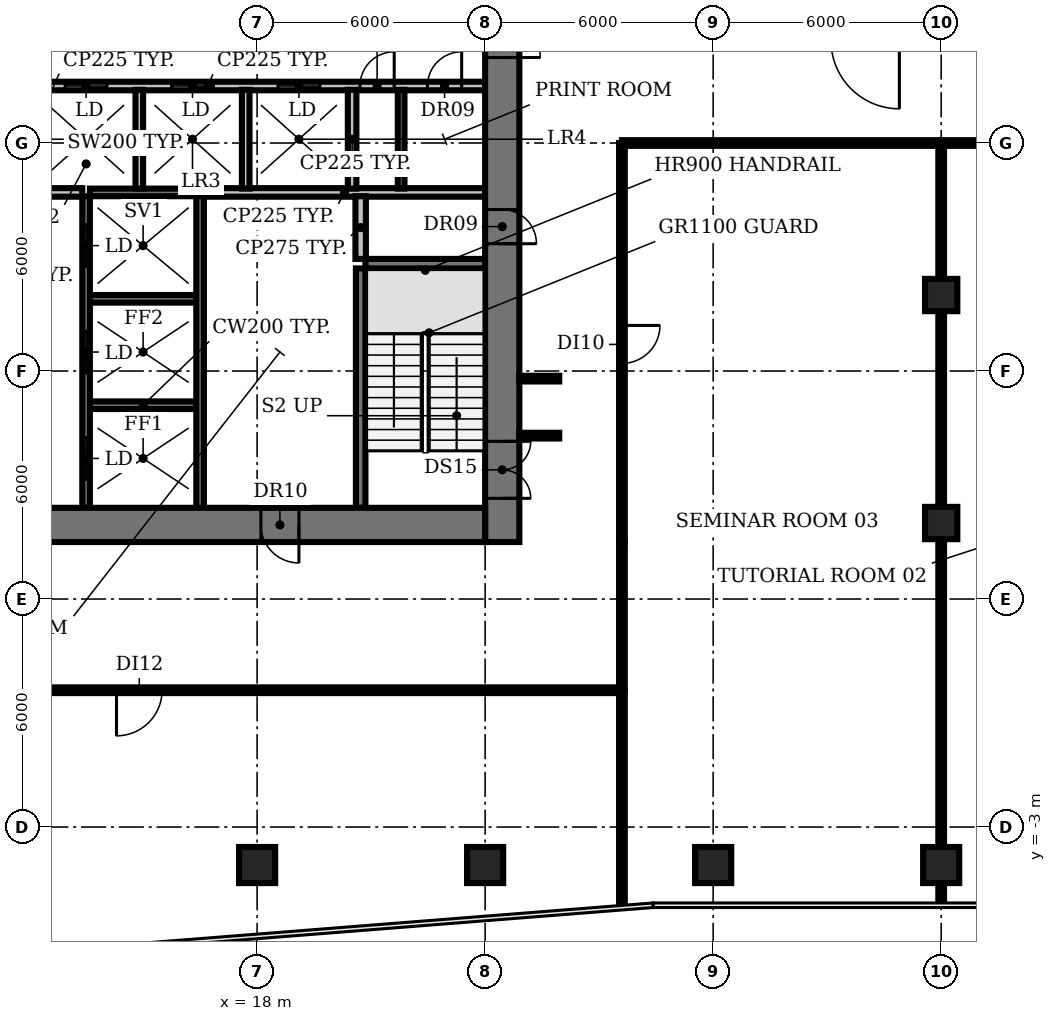
"""IFC4 building model, lengths in metres.
Left out: names, types, materials, properties, quantities, classifications, styles, units other than length and angle.
Written with IfcOpenShell. Run it as: python <this file> out.ifc"""

import sys

from ifc_helpers import new_model, si_unit, direction, frame, frame_2d, origin, origin_2d, place, context, subcontext, project, spatial, rectangle, extrude, element, fill, save


model = new_model("IFC4")
c1 = context("Model", 3, precision=1e-05, world=origin(), true_north=direction((0.0, 1.0)))
c2 = subcontext(c1, "Body", "Model", "MODEL_VIEW")
j1 = project(units=[si_unit("LENGTHUNIT", "METRE"), si_unit("PLANEANGLEUNIT", "RADIAN")], contexts=[c1])
p1 = place(None, origin())
s1 = spatial("IfcSite", under=j1, at=p1, CompositionType="ELEMENT")
p2 = place(p1, origin())
s2 = spatial("IfcBuilding", under=s1, at=p2, CompositionType="ELEMENT")
p3 = place(p2, frame((0.0, 0.0, 71.0)))
s3 = spatial("IfcBuildingStorey", under=s2, at=p3, CompositionType="ELEMENT", Elevation=71.0)
for number, where, z_axis, x_axis in (
    (1, (18.0, -4.0, 0.0), (0.0, 0.0, 1.0), (1.0, 0.0, 0.0)),
    (2, (24.0, -4.0, 0.0), (0.0, 0.0, 1.0), (1.0, 0.0, 0.0)),
    (3, (30.0, -4.0, 0.0), (0.0, 0.0, 1.0), (1.0, 0.0, 0.0)),
    (4, (36.0, -4.0, 0.0), (0.0, 0.0, 1.0), (1.0, 0.0, 0.0)),
):
    element("IfcColumn", number, at=place(p3, frame(where, z_axis=z_axis, x_axis=x_axis)), inside=s3, PredefinedType="COLUMN", context=c2, shape_type="SweptSolid", body=[
        extrude(rectangle(XDim=0.95, YDim=0.95, at=origin_2d()), origin(), (0.0, 0.0, 1.0), 3.85),
    ])
for number, where, z_axis, x_axis in (
    (5, (36.0, 5.0, 0.0), (0.0, 0.0, 1.0), (1.0, 0.0, 0.0)),
    (6, (36.0, 11.0, 0.0), (0.0, 0.0, 1.0), (1.0, 0.0, 0.0)),
):
    element("IfcColumn", number, at=place(p3, frame(where, z_axis=z_axis, x_axis=x_axis)), inside=s3, PredefinedType="COLUMN", context=c2, shape_type="SweptSolid", body=[
        extrude(rectangle(XDim=0.85, YDim=0.85, at=origin_2d()), origin(), (0.0, 0.0, 1.0), 3.85),
    ])
for number, where, z_axis, x_axis in (
    (7, (13.6, 8.1, 0.0), (0.0, 0.0, 1.0), (1.0, 0.0, 0.0)),
    (8, (13.6, 10.9, 0.0), (0.0, 0.0, 1.0), (1.0, 0.0, 0.0)),
):
    element("IfcWall", number, at=place(p3, frame(where, z_axis=z_axis, x_axis=x_axis)), inside=s3, PredefinedType="SHEAR", context=c2, shape_type="SweptSolid", body=[
        extrude(rectangle(XDim=2.8, YDim=0.2, at=frame_2d((1.4, 0.0))), origin(), (0.0, 0.0, 1.0), 3.85),
    ])
p4 = place(p3, frame((20.85, 11.825, 0.0), z_axis=(0.0, 0.0, 1.0), x_axis=(1.0, 0.0, 0.0)))
e9 = element("IfcWall", 9, at=p4, inside=s3, PredefinedType="SHEAR", context=c2, shape_type="SweptSolid", body=[
    extrude(rectangle(XDim=3.15, YDim=0.25, at=frame_2d((1.575, 0.0))), origin(), (0.0, 0.0, 1.0), 3.85),
])
p5 = place(p3, frame((9.4, 13.7, 0.0), z_axis=(0.0, 0.0, 1.0), x_axis=(1.0, 0.0, 0.0)))
e10 = element("IfcWall", 10, at=p5, inside=s3, PredefinedType="PARTITIONING", context=c2, shape_type="SweptSolid", body=[
    extrude(rectangle(XDim=4.0, YDim=0.225, at=frame_2d((2.0, 0.0))), origin(), (0.0, 0.0, 1.0), 3.85),
])
p6 = place(p3, frame((13.6, 13.7, 0.0), z_axis=(0.0, 0.0, 1.0), x_axis=(1.0, 0.0, 0.0)))
e11 = element("IfcWall", 11, at=p6, inside=s3, PredefinedType="SHEAR", context=c2, shape_type="SweptSolid", body=[
    extrude(rectangle(XDim=2.8, YDim=0.2, at=frame_2d((1.4, 0.0))), origin(), (0.0, 0.0, 1.0), 3.85),
])
p7 = place(p3, frame((16.6, 13.7, 0.0), z_axis=(0.0, 0.0, 1.0), x_axis=(1.0, 0.0, 0.0)))
e12 = element("IfcWall", 12, at=p7, inside=s3, PredefinedType="PARTITIONING", context=c2, shape_type="SweptSolid", body=[
    extrude(rectangle(XDim=7.4, YDim=0.225, at=frame_2d((3.7, 0.0))), origin(), (0.0, 0.0, 1.0), 3.85),
])
p8 = place(p3, frame((9.4, 16.5, 0.0), z_axis=(0.0, 0.0, 1.0), x_axis=(1.0, 0.0, 0.0)))
e13 = element("IfcWall", 13, at=p8, inside=s3, PredefinedType="PARTITIONING", context=c2, shape_type="SweptSolid", body=[
    extrude(rectangle(XDim=14.6, YDim=0.225, at=frame_2d((7.3, 0.0))), origin(), (0.0, 0.0, 1.0), 3.85),
])
p9 = place(p8, frame((0.75, 0.0, 0.0)))
e14 = element("IfcOpeningElement", 14, at=p9, cuts=e13, PredefinedType="OPENING", context=c2, shape_type="SweptSolid", body=[
    extrude(rectangle(XDim=1.1, YDim=2.1, at=frame_2d((0.55, 1.05))), frame((0.0, 0.123, 0.0), z_axis=(0.0, -1.0, 0.0), x_axis=(1.0, 0.0, 0.0)), (0.0, 0.0, 1.0), 0.245),
])
p10 = place(p8, frame((3.55, 0.0, 0.0)))
e15 = element("IfcOpeningElement", 15, at=p10, cuts=e13, PredefinedType="OPENING", context=c2, shape_type="SweptSolid", body=[
    extrude(rectangle(XDim=1.1, YDim=2.1, at=frame_2d((0.55, 1.05))), frame((0.0, 0.123, 0.0), z_axis=(0.0, -1.0, 0.0), x_axis=(1.0, 0.0, 0.0)), (0.0, 0.0, 1.0), 0.245),
])
p11 = place(p8, frame((6.35, 0.0, 0.0)))
e16 = element("IfcOpeningElement", 16, at=p11, cuts=e13, PredefinedType="OPENING", context=c2, shape_type="SweptSolid", body=[
    extrude(rectangle(XDim=1.1, YDim=2.1, at=frame_2d((0.55, 1.05))), frame((0.0, 0.123, 0.0), z_axis=(0.0, -1.0, 0.0), x_axis=(1.0, 0.0, 0.0)), (0.0, 0.0, 1.0), 0.245),
])
p12 = place(p8, frame((9.15, 0.0, 0.0)))
e17 = element("IfcOpeningElement", 17, at=p12, cuts=e13, PredefinedType="OPENING", context=c2, shape_type="SweptSolid", body=[
    extrude(rectangle(XDim=1.1, YDim=2.1, at=frame_2d((0.55, 1.05))), frame((0.0, 0.123, 0.0), z_axis=(0.0, -1.0, 0.0), x_axis=(1.0, 0.0, 0.0)), (0.0, 0.0, 1.0), 0.245),
])
p13 = place(p8, frame((11.308, 0.0, 0.0)))
e18 = element("IfcOpeningElement", 18, at=p13, cuts=e13, PredefinedType="OPENING", context=c2, shape_type="SweptSolid", body=[
    extrude(rectangle(XDim=0.9, YDim=2.1, at=frame_2d((0.45, 1.05))), frame((0.0, 0.123, 0.0), z_axis=(0.0, -1.0, 0.0), x_axis=(1.0, 0.0, 0.0)), (0.0, 0.0, 1.0), 0.245),
])
p14 = place(p8, frame((13.083, 0.0, 0.0)))
e19 = element("IfcOpeningElement", 19, at=p14, cuts=e13, PredefinedType="OPENING", context=c2, shape_type="SweptSolid", body=[
    extrude(rectangle(XDim=0.9, YDim=2.1, at=frame_2d((0.45, 1.05))), frame((0.0, 0.123, 0.0), z_axis=(0.0, -1.0, 0.0), x_axis=(1.0, 0.0, 0.0)), (0.0, 0.0, 1.0), 0.245),
])
p15 = place(p3, frame((13.5, 5.4, 0.0), z_axis=(0.0, 0.0, 1.0), x_axis=(0.0, 1.0, 0.0)))
e20 = element("IfcWall", 20, at=p15, inside=s3, PredefinedType="SHEAR", context=c2, shape_type="SweptSolid", body=[
    extrude(rectangle(XDim=8.2, YDim=0.2, at=frame_2d((4.1, 0.0))), origin(), (0.0, 0.0, 1.0), 3.85),
])
p16 = place(p15, frame((0.75, 0.0, 0.0)))
e21 = element("IfcOpeningElement", 21, at=p16, cuts=e20, PredefinedType="OPENING", context=c2, shape_type="SweptSolid", body=[
    extrude(rectangle(XDim=1.1, YDim=2.1, at=frame_2d((0.55, 1.05))), frame((0.0, 0.11, 0.0), z_axis=(0.0, -1.0, 0.0), x_axis=(1.0, 0.0, 0.0)), (0.0, 0.0, 1.0), 0.22),
])
p17 = place(p15, frame((3.55, 0.0, 0.0)))
e22 = element("IfcOpeningElement", 22, at=p17, cuts=e20, PredefinedType="OPENING", context=c2, shape_type="SweptSolid", body=[
    extrude(rectangle(XDim=1.1, YDim=2.1, at=frame_2d((0.55, 1.05))), frame((0.0, 0.11, 0.0), z_axis=(0.0, -1.0, 0.0), x_axis=(1.0, 0.0, 0.0)), (0.0, 0.0, 1.0), 0.22),
])
p18 = place(p15, frame((6.35, 0.0, 0.0)))
e23 = element("IfcOpeningElement", 23, at=p18, cuts=e20, PredefinedType="OPENING", context=c2, shape_type="SweptSolid", body=[
    extrude(rectangle(XDim=1.1, YDim=2.1, at=frame_2d((0.55, 1.05))), frame((0.0, 0.11, 0.0), z_axis=(0.0, -1.0, 0.0), x_axis=(1.0, 0.0, 0.0)), (0.0, 0.0, 1.0), 0.22),
])
p19 = place(p3, frame((14.9, 13.8, 0.0), z_axis=(0.0, 0.0, 1.0), x_axis=(0.0, 1.0, 0.0)))
e24 = element("IfcWall", 24, at=p19, inside=s3, PredefinedType="SOLIDWALL", context=c2, shape_type="SweptSolid", body=[
    extrude(rectangle(XDim=2.6, YDim=0.2, at=frame_2d((1.3, 0.0))), origin(), (0.0, 0.0, 1.0), 3.85),
])
p20 = place(p3, frame((16.5, 5.4, 0.0), z_axis=(0.0, 0.0, 1.0), x_axis=(0.0, 1.0, 0.0)))
e25 = element("IfcWall", 25, at=p20, inside=s3, PredefinedType="SHEAR", context=c2, shape_type="SweptSolid", body=[
    extrude(rectangle(XDim=8.2, YDim=0.2, at=frame_2d((4.1, 0.0))), origin(), (0.0, 0.0, 1.0), 3.85),
])
p21 = place(p3, frame((17.7, 13.8, 0.0), z_axis=(0.0, 0.0, 1.0), x_axis=(0.0, 1.0, 0.0)))
e26 = element("IfcWall", 26, at=p21, inside=s3, PredefinedType="SOLIDWALL", context=c2, shape_type="SweptSolid", body=[
    extrude(rectangle(XDim=2.6, YDim=0.2, at=frame_2d((1.3, 0.0))), origin(), (0.0, 0.0, 1.0), 3.85),
])
p22 = place(p3, frame((20.5, 13.8, 0.0), z_axis=(0.0, 0.0, 1.0), x_axis=(0.0, 1.0, 0.0)))
e27 = element("IfcWall", 27, at=p22, inside=s3, PredefinedType="PARTITIONING", context=c2, shape_type="SweptSolid", body=[
    extrude(rectangle(XDim=2.6, YDim=0.225, at=frame_2d((1.3, 0.0))), origin(), (0.0, 0.0, 1.0), 3.85),
])
p23 = place(p3, frame((20.725, 5.4, 0.0), z_axis=(0.0, 0.0, 1.0), x_axis=(0.0, 1.0, 0.0)))
e28 = element("IfcWall", 28, at=p23, inside=s3, PredefinedType="SHEAR", context=c2, shape_type="SweptSolid", body=[
    extrude(rectangle(XDim=6.3, YDim=0.25, at=frame_2d((3.15, 0.0))), origin(), (0.0, 0.0, 1.0), 3.85),
])
p24 = place(p3, frame((20.725, 11.95, 0.0), z_axis=(0.0, 0.0, 1.0), x_axis=(0.0, 1.0, 0.0)))
e29 = element("IfcWall", 29, at=p24, inside=s3, PredefinedType="PARTITIONING", context=c2, shape_type="SweptSolid", body=[
    extrude(rectangle(XDim=1.65, YDim=0.275, at=frame_2d((0.825, 0.0))), origin(), (0.0, 0.0, 1.0), 3.85),
])
p25 = place(p3, frame((21.79, 13.8, 0.0), z_axis=(0.0, 0.0, 1.0), x_axis=(0.0, 1.0, 0.0)))
e30 = element("IfcWall", 30, at=p25, inside=s3, PredefinedType="PARTITIONING", context=c2, shape_type="SweptSolid", body=[
    extrude(rectangle(XDim=2.6, YDim=0.175, at=frame_2d((1.3, 0.0))), origin(), (0.0, 0.0, 1.0), 3.85),
])
p26 = place(p3, frame((24.45, 25.7, 0.0), z_axis=(0.0, 0.0, 1.0), x_axis=(0.0, -1.0, 0.0)))
e31 = element("IfcWall", 31, at=p26, inside=s3, PredefinedType="SHEAR", context=c2, shape_type="SweptSolid", body=[
    extrude(rectangle(XDim=21.2, YDim=0.9, at=frame_2d((10.6, 0.0))), origin(), (0.0, 0.0, 1.0), 3.85),
])
p27 = place(p26, frame((18.55, 0.0, 0.0)))
e32 = element("IfcOpeningElement", 32, at=p27, cuts=e31, PredefinedType="OPENING", context=c2, shape_type="SweptSolid", body=[
    extrude(rectangle(XDim=1.5, YDim=2.1, at=frame_2d((0.75, 1.05))), frame((0.0, 0.46, 0.0), z_axis=(0.0, -1.0, 0.0), x_axis=(1.0, 0.0, 0.0)), (0.0, 0.0, 1.0), 0.92),
])
p28 = place(p26, frame((12.45, 0.0, 0.0)))
e33 = element("IfcOpeningElement", 33, at=p28, cuts=e31, PredefinedType="OPENING", context=c2, shape_type="SweptSolid", body=[
    extrude(rectangle(XDim=0.9, YDim=2.1, at=frame_2d((0.45, 1.05))), frame((0.0, 0.46, 0.0), z_axis=(0.0, -1.0, 0.0), x_axis=(1.0, 0.0, 0.0)), (0.0, 0.0, 1.0), 0.92),
])
p29 = place(p26, frame((6.45, 0.0, 0.0)))
e34 = element("IfcOpeningElement", 34, at=p29, cuts=e31, PredefinedType="OPENING", context=c2, shape_type="SweptSolid", body=[
    extrude(rectangle(XDim=2.0, YDim=2.1, at=frame_2d((1.0, 1.05))), frame((0.0, 0.46, 0.0), z_axis=(0.0, -1.0, 0.0), x_axis=(1.0, 0.0, 0.0)), (0.0, 0.0, 1.0), 0.92),
])
p30 = place(p3, frame((24.0, 4.95, 0.0), z_axis=(0.0, 0.0, 1.0), x_axis=(-1.0, 0.0, 0.0)))
e35 = element("IfcWall", 35, at=p30, inside=s3, PredefinedType="SHEAR", context=c2, shape_type="SweptSolid", body=[
    extrude(rectangle(XDim=18.0, YDim=0.9, at=frame_2d((9.0, 0.0))), origin(), (0.0, 0.0, 1.0), 3.85),
])
p31 = place(p30, frame((13.0, 0.0, 0.0)))
e36 = element("IfcOpeningElement", 36, at=p31, cuts=e35, PredefinedType="OPENING", context=c2, shape_type="SweptSolid", body=[
    extrude(rectangle(XDim=1.2, YDim=2.1, at=frame_2d((0.6, 1.05))), frame((0.0, 0.46, 0.0), z_axis=(0.0, -1.0, 0.0), x_axis=(1.0, 0.0, 0.0)), (0.0, 0.0, 1.0), 0.92),
])
p32 = place(p30, frame((4.9, 0.0, 0.0)))
e37 = element("IfcOpeningElement", 37, at=p32, cuts=e35, PredefinedType="OPENING", context=c2, shape_type="SweptSolid", body=[
    extrude(rectangle(XDim=1.0, YDim=2.1, at=frame_2d((0.5, 1.05))), frame((0.0, 0.46, 0.0), z_axis=(0.0, -1.0, 0.0), x_axis=(1.0, 0.0, 0.0)), (0.0, 0.0, 1.0), 0.92),
])
for number, where, z_axis, x_axis in (
    (38, (24.9, 7.3, 0.0), (0.0, 0.0, 1.0), (1.0, 0.0, 0.0)),
    (39, (24.9, 8.8, 0.0), (0.0, 0.0, 1.0), (1.0, 0.0, 0.0)),
):
    element("IfcWall", number, at=place(p3, frame(where, z_axis=z_axis, x_axis=x_axis)), inside=s3, PredefinedType="PARTITIONING", context=c2, shape_type="SweptSolid", body=[
        extrude(rectangle(XDim=1.05, YDim=0.15, at=frame_2d((0.525, 0.0))), origin(), (0.0, 0.0, 1.0), 2.83),
    ])
p33 = place(p3, frame((27.6, -5.07, 0.0), z_axis=(0.0, 0.0, 1.0), x_axis=(0.0, 1.0, 0.0)))
e40 = element("IfcWall", 40, at=p33, inside=s3, PredefinedType="PARTITIONING", context=c2, shape_type="SweptSolid", body=[
    extrude(rectangle(XDim=5.67, YDim=0.15, at=frame_2d((2.835, 0.0))), origin(), (0.0, 0.0, 1.0), 2.83),
])
p34 = place(p3, frame((27.6, 0.6, 0.0), z_axis=(0.0, 0.0, 1.0), x_axis=(-1.0, 0.0, 0.0)))
e41 = element("IfcWall", 41, at=p34, inside=s3, PredefinedType="PARTITIONING", context=c2, shape_type="SweptSolid", body=[
    extrude(rectangle(XDim=25.2, YDim=0.15, at=frame_2d((12.6, 0.0))), origin(), (0.0, 0.0, 1.0), 2.83),
])
p35 = place(p34, frame((12.1, 0.0, 0.0)))
e42 = element("IfcOpeningElement", 42, at=p35, cuts=e41, PredefinedType="OPENING", context=c2, shape_type="SweptSolid", body=[
    extrude(rectangle(XDim=1.2, YDim=2.1, at=frame_2d((0.6, 1.05))), frame((0.0, 0.085, 0.0), z_axis=(0.0, -1.0, 0.0), x_axis=(1.0, 0.0, 0.0)), (0.0, 0.0, 1.0), 0.17),
])
p36 = place(p3, frame((27.6, 0.6, 0.0), z_axis=(0.0, 0.0, 1.0), x_axis=(0.0, 1.0, 0.0)))
e43 = element("IfcWall", 43, at=p36, inside=s3, PredefinedType="PARTITIONING", context=c2, shape_type="SweptSolid", body=[
    extrude(rectangle(XDim=3.9, YDim=0.15, at=frame_2d((1.95, 0.0))), origin(), (0.0, 0.0, 1.0), 2.83),
])
p37 = place(p3, frame((27.6, 15.0, 0.0), z_axis=(0.0, 0.0, 1.0), x_axis=(0.0, -1.0, 0.0)))
e44 = element("IfcWall", 44, at=p37, inside=s3, PredefinedType="PARTITIONING", context=c2, shape_type="SweptSolid", body=[
    extrude(rectangle(XDim=10.5, YDim=0.15, at=frame_2d((5.25, 0.0))), origin(), (0.0, 0.0, 1.0), 2.83),
])
p38 = place(p37, frame((4.8, 0.0, 0.0)))
e45 = element("IfcOpeningElement", 45, at=p38, cuts=e44, PredefinedType="OPENING", context=c2, shape_type="SweptSolid", body=[
    extrude(rectangle(XDim=1.0, YDim=2.1, at=frame_2d((0.5, 1.05))), frame((0.0, 0.085, 0.0), z_axis=(0.0, -1.0, 0.0), x_axis=(1.0, 0.0, 0.0)), (0.0, 0.0, 1.0), 0.17),
])
p39 = place(p3, frame((27.6, 15.0, 0.0), z_axis=(0.0, 0.0, 1.0), x_axis=(1.0, 0.0, 0.0)))
e46 = element("IfcWall", 46, at=p39, inside=s3, PredefinedType="PARTITIONING", context=c2, shape_type="SweptSolid", body=[
    extrude(rectangle(XDim=8.4, YDim=0.15, at=frame_2d((4.2, 0.0))), origin(), (0.0, 0.0, 1.0), 2.83),
])
p40 = place(p3, frame((36.0, -5.01, 0.0), z_axis=(0.0, 0.0, 1.0), x_axis=(0.0, 1.0, 0.0)))
e47 = element("IfcWall", 47, at=p40, inside=s3, PredefinedType="PARTITIONING", context=c2, shape_type="SweptSolid", body=[
    extrude(rectangle(XDim=20.01, YDim=0.15, at=frame_2d((10.005, 0.0))), origin(), (0.0, 0.0, 1.0), 2.83),
])
p41 = place(p3, frame((42.0, 15.0, 0.0), z_axis=(0.0, 0.0, 1.0), x_axis=(-1.0, 0.0, 0.0)))
e48 = element("IfcWall", 48, at=p41, inside=s3, PredefinedType="PARTITIONING", context=c2, shape_type="SweptSolid", body=[
    extrude(rectangle(XDim=6.0, YDim=0.15, at=frame_2d((3.0, 0.0))), origin(), (0.0, 0.0, 1.0), 2.83),
])
p42 = place(p41, frame((2.4, 0.0, 0.0)))
e49 = element("IfcOpeningElement", 49, at=p42, cuts=e48, PredefinedType="OPENING", context=c2, shape_type="SweptSolid", body=[
    extrude(rectangle(XDim=1.0, YDim=2.1, at=frame_2d((0.5, 1.05))), frame((0.0, 0.085, 0.0), z_axis=(0.0, -1.0, 0.0), x_axis=(1.0, 0.0, 0.0)), (0.0, 0.0, 1.0), 0.17),
])
p43 = place(p10, origin())
e50 = element("IfcDoor", 50, at=p43, inside=s3, OperationType="DOUBLE_DOOR_SLIDING", PredefinedType="DOOR", context=c2, shape_type="SweptSolid", body=[
    extrude(rectangle(XDim=1.1, YDim=2.1, at=frame_2d((0.55, 1.05))), frame((0.0, 0.025, 0.0), z_axis=(0.0, -1.0, 0.0), x_axis=(1.0, 0.0, 0.0)), (0.0, 0.0, 1.0), 0.05),
])
fill(e15, e50)
p44 = place(p11, origin())
e51 = element("IfcDoor", 51, at=p44, inside=s3, OperationType="DOUBLE_DOOR_SLIDING", PredefinedType="DOOR", context=c2, shape_type="SweptSolid", body=[
    extrude(rectangle(XDim=1.1, YDim=2.1, at=frame_2d((0.55, 1.05))), frame((0.0, 0.025, 0.0), z_axis=(0.0, -1.0, 0.0), x_axis=(1.0, 0.0, 0.0)), (0.0, 0.0, 1.0), 0.05),
])
fill(e16, e51)
p45 = place(p12, origin())
e52 = element("IfcDoor", 52, at=p45, inside=s3, OperationType="DOUBLE_DOOR_SLIDING", PredefinedType="DOOR", context=c2, shape_type="SweptSolid", body=[
    extrude(rectangle(XDim=1.1, YDim=2.1, at=frame_2d((0.55, 1.05))), frame((0.0, 0.025, 0.0), z_axis=(0.0, -1.0, 0.0), x_axis=(1.0, 0.0, 0.0)), (0.0, 0.0, 1.0), 0.05),
])
fill(e17, e52)
p46 = place(p13, origin())
e53 = element("IfcDoor", 53, at=p46, inside=s3, OperationType="SINGLE_SWING_RIGHT", PredefinedType="DOOR", context=c2, shape_type="SweptSolid", body=[
    extrude(rectangle(XDim=0.9, YDim=2.1, at=frame_2d((0.45, 1.05))), frame((0.0, 0.025, 0.0), z_axis=(0.0, -1.0, 0.0), x_axis=(1.0, 0.0, 0.0)), (0.0, 0.0, 1.0), 0.05),
])
fill(e18, e53)
p47 = place(p14, origin())
e54 = element("IfcDoor", 54, at=p47, inside=s3, OperationType="SINGLE_SWING_RIGHT", PredefinedType="DOOR", context=c2, shape_type="SweptSolid", body=[
    extrude(rectangle(XDim=0.9, YDim=2.1, at=frame_2d((0.45, 1.05))), frame((0.0, 0.025, 0.0), z_axis=(0.0, -1.0, 0.0), x_axis=(1.0, 0.0, 0.0)), (0.0, 0.0, 1.0), 0.05),
])
fill(e19, e54)
p48 = place(p16, origin())
e55 = element("IfcDoor", 55, at=p48, inside=s3, OperationType="DOUBLE_DOOR_SLIDING", PredefinedType="DOOR", context=c2, shape_type="SweptSolid", body=[
    extrude(rectangle(XDim=1.1, YDim=2.1, at=frame_2d((0.55, 1.05))), frame((0.0, 0.025, 0.0), z_axis=(0.0, -1.0, 0.0), x_axis=(1.0, 0.0, 0.0)), (0.0, 0.0, 1.0), 0.05),
])
fill(e21, e55)
p49 = place(p17, origin())
e56 = element("IfcDoor", 56, at=p49, inside=s3, OperationType="DOUBLE_DOOR_SLIDING", PredefinedType="DOOR", context=c2, shape_type="SweptSolid", body=[
    extrude(rectangle(XDim=1.1, YDim=2.1, at=frame_2d((0.55, 1.05))), frame((0.0, 0.025, 0.0), z_axis=(0.0, -1.0, 0.0), x_axis=(1.0, 0.0, 0.0)), (0.0, 0.0, 1.0), 0.05),
])
fill(e22, e56)
p50 = place(p18, origin())
e57 = element("IfcDoor", 57, at=p50, inside=s3, OperationType="DOUBLE_DOOR_SLIDING", PredefinedType="DOOR", context=c2, shape_type="SweptSolid", body=[
    extrude(rectangle(XDim=1.1, YDim=2.1, at=frame_2d((0.55, 1.05))), frame((0.0, 0.025, 0.0), z_axis=(0.0, -1.0, 0.0), x_axis=(1.0, 0.0, 0.0)), (0.0, 0.0, 1.0), 0.05),
])
fill(e23, e57)
p51 = place(p27, origin())
e58 = element("IfcDoor", 58, at=p51, inside=s3, OperationType="DOUBLE_DOOR_SINGLE_SWING", PredefinedType="DOOR", context=c2, shape_type="SweptSolid", body=[
    extrude(rectangle(XDim=1.5, YDim=2.1, at=frame_2d((0.75, 1.05))), frame((0.0, 0.025, 0.0), z_axis=(0.0, -1.0, 0.0), x_axis=(1.0, 0.0, 0.0)), (0.0, 0.0, 1.0), 0.05),
])
fill(e32, e58)
p52 = place(p28, origin())
e59 = element("IfcDoor", 59, at=p52, inside=s3, OperationType="SINGLE_SWING_RIGHT", PredefinedType="DOOR", context=c2, shape_type="SweptSolid", body=[
    extrude(rectangle(XDim=0.9, YDim=2.1, at=frame_2d((0.45, 1.05))), frame((0.0, -0.39, 0.0), z_axis=(0.0, -1.0, 0.0), x_axis=(1.0, 0.0, 0.0)), (0.0, 0.0, 1.0), 0.05),
])
fill(e33, e59)
p53 = place(p29, origin())
e60 = element("IfcDoor", 60, at=p53, inside=s3, OperationType="DOUBLE_DOOR_SINGLE_SWING", PredefinedType="DOOR", context=c2, shape_type="SweptSolid", body=[
    extrude(rectangle(XDim=2.0, YDim=2.1, at=frame_2d((1.0, 1.05))), frame((0.0, 0.025, 0.0), z_axis=(0.0, -1.0, 0.0), x_axis=(1.0, 0.0, 0.0)), (0.0, 0.0, 1.0), 0.05),
])
fill(e34, e60)
p54 = place(p32, origin())
e61 = element("IfcDoor", 61, at=p54, inside=s3, OperationType="SINGLE_SWING_LEFT", PredefinedType="DOOR", context=c2, shape_type="SweptSolid", body=[
    extrude(rectangle(XDim=1.0, YDim=2.1, at=frame_2d((0.5, 1.05))), frame((0.0, -0.39, 0.0), z_axis=(0.0, -1.0, 0.0), x_axis=(1.0, 0.0, 0.0)), (0.0, 0.0, 1.0), 0.05),
])
fill(e37, e61)
p55 = place(p35, origin())
e62 = element("IfcDoor", 62, at=p55, inside=s3, OperationType="SINGLE_SWING_RIGHT", PredefinedType="DOOR", context=c2, shape_type="SweptSolid", body=[
    extrude(rectangle(XDim=1.2, YDim=2.1, at=frame_2d((0.6, 1.05))), frame((0.0, 0.025, 0.0), z_axis=(0.0, -1.0, 0.0), x_axis=(1.0, 0.0, 0.0)), (0.0, 0.0, 1.0), 0.05),
])
fill(e42, e62)
p56 = place(p38, origin())
e63 = element("IfcDoor", 63, at=p56, inside=s3, OperationType="SINGLE_SWING_LEFT", PredefinedType="DOOR", context=c2, shape_type="SweptSolid", body=[
    extrude(rectangle(XDim=1.0, YDim=2.1, at=frame_2d((0.5, 1.05))), frame((0.0, 0.025, 0.0), z_axis=(0.0, -1.0, 0.0), x_axis=(1.0, 0.0, 0.0)), (0.0, 0.0, 1.0), 0.05),
])
fill(e45, e63)
save(model, sys.argv[1])
